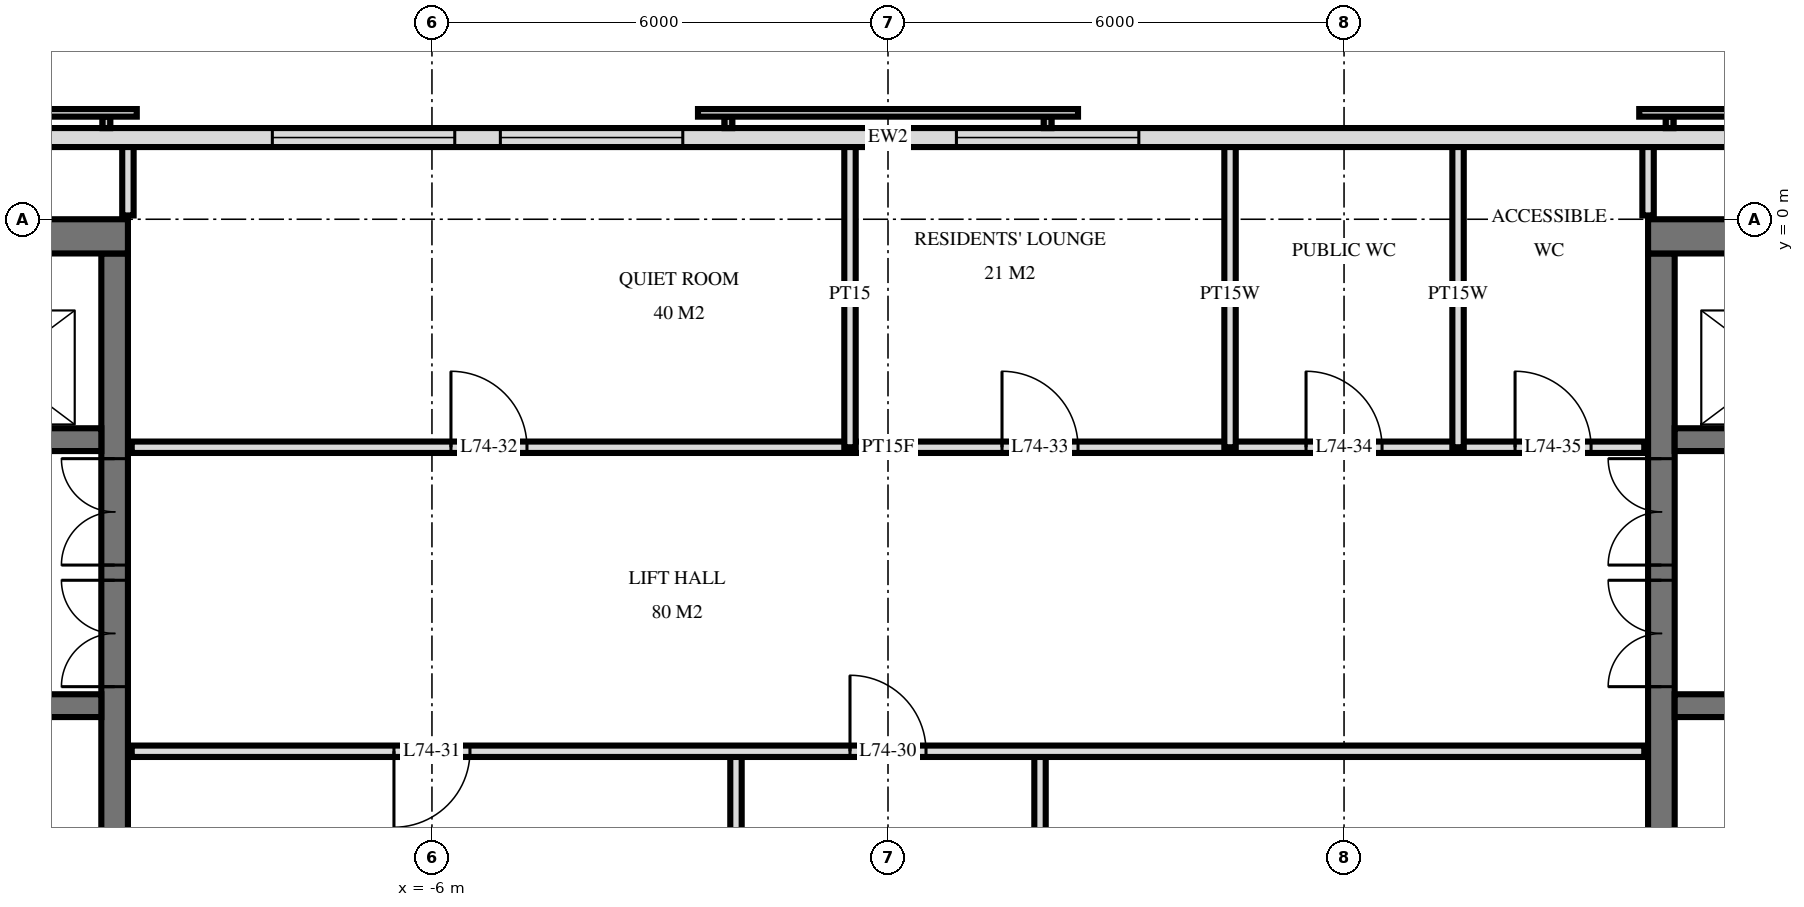
"""IFC4 building model, lengths in metres.
Left out: names, types, materials, properties, quantities, classifications, styles, units other than length and angle.
Written with IfcOpenShell. Run it as: python <this file> out.ifc"""

import sys

from ifc_helpers import new_model, si_unit, direction, frame, frame_2d, origin, place, context, subcontext, project, spatial, rectangle, extrude, element, fill, save


model = new_model("IFC4")
c1 = context("Model", 3, precision=1e-05, world=origin(), true_north=direction((0.0, 1.0)))
c2 = subcontext(c1, "Body", "Model", "MODEL_VIEW")
j1 = project(units=[si_unit("LENGTHUNIT", "METRE"), si_unit("PLANEANGLEUNIT", "RADIAN")], contexts=[c1])
p1 = place(None, origin())
s1 = spatial("IfcSite", under=j1, at=p1, CompositionType="ELEMENT")
p2 = place(p1, origin())
s2 = spatial("IfcBuilding", under=s1, at=p2, CompositionType="ELEMENT")
p3 = place(p2, frame((0.0, 0.0, 280.6)))
s3 = spatial("IfcBuildingStorey", under=s2, at=p3, CompositionType="ELEMENT", Elevation=280.6)
p4 = place(p3, frame((-19.5, -0.225, 0.0), z_axis=(0.0, 0.0, 1.0), x_axis=(1.0, 0.0, 0.0)))
e1 = element("IfcWall", 1, at=p4, inside=s3, PredefinedType="SHEAR", context=c2, shape_type="SweptSolid", body=[
    extrude(rectangle(XDim=9.5, YDim=0.45, at=frame_2d((4.75, 0.0))), origin(), (0.0, 0.0, 1.0), 3.5),
])
p5 = place(p3, frame((-10.175, -14.55, 0.0), z_axis=(0.0, 0.0, 1.0), x_axis=(0.0, 1.0, 0.0)))
e2 = element("IfcWall", 2, at=p5, inside=s3, PredefinedType="SHEAR", context=c2, shape_type="SweptSolid", body=[
    extrude(rectangle(XDim=14.1, YDim=0.35, at=frame_2d((7.05, 0.0))), origin(), (0.0, 0.0, 1.0), 3.5),
])
p6 = place(p5, frame((8.4, 0.0, 0.0)))
e3 = element("IfcOpeningElement", 3, at=p6, cuts=e2, PredefinedType="OPENING", context=c2, shape_type="SweptSolid", body=[
    extrude(rectangle(XDim=1.4, YDim=2.4, at=frame_2d((0.7, 1.2))), frame((0.0, 0.185, 0.0), z_axis=(0.0, -1.0, 0.0), x_axis=(1.0, 0.0, 0.0)), (0.0, 0.0, 1.0), 0.37),
])
p7 = place(p5, frame((10.0, 0.0, 0.0)))
e4 = element("IfcOpeningElement", 4, at=p7, cuts=e2, PredefinedType="OPENING", context=c2, shape_type="SweptSolid", body=[
    extrude(rectangle(XDim=1.4, YDim=2.4, at=frame_2d((0.7, 1.2))), frame((0.0, 0.185, 0.0), z_axis=(0.0, -1.0, 0.0), x_axis=(1.0, 0.0, 0.0)), (0.0, 0.0, 1.0), 0.37),
])
p8 = place(p5, frame((4.0, 0.0, 0.0)))
e5 = element("IfcOpeningElement", 5, at=p8, cuts=e2, PredefinedType="OPENING", context=c2, shape_type="SweptSolid", body=[
    extrude(rectangle(XDim=1.2, YDim=2.1, at=frame_2d((0.6, 1.05))), frame((0.0, 0.185, 0.0), z_axis=(0.0, -1.0, 0.0), x_axis=(1.0, 0.0, 0.0)), (0.0, 0.0, 1.0), 0.37),
])
p9 = place(p3, frame((-19.05, -2.9, 0.0), z_axis=(0.0, 0.0, 1.0), x_axis=(1.0, 0.0, 0.0)))
e6 = element("IfcWall", 6, at=p9, inside=s3, PredefinedType="SHEAR", context=c2, shape_type="SweptSolid", body=[
    extrude(rectangle(XDim=8.7, YDim=0.3, at=frame_2d((4.35, 0.0))), origin(), (0.0, 0.0, 1.0), 3.5),
])
p10 = place(p9, frame((6.8, 0.0, 0.0)))
e7 = element("IfcOpeningElement", 7, at=p10, cuts=e6, PredefinedType="OPENING", context=c2, shape_type="SweptSolid", body=[
    extrude(rectangle(XDim=1.1, YDim=2.1, at=frame_2d((0.55, 1.05))), frame((0.0, 0.16, 0.0), z_axis=(0.0, -1.0, 0.0), x_axis=(1.0, 0.0, 0.0)), (0.0, 0.0, 1.0), 0.32),
])
p11 = place(p9, frame((3.8, 0.0, 0.0)))
e8 = element("IfcOpeningElement", 8, at=p11, cuts=e6, PredefinedType="OPENING", context=c2, shape_type="SweptSolid", body=[
    extrude(rectangle(XDim=1.1, YDim=2.1, at=frame_2d((0.55, 1.05))), frame((0.0, 0.16, 0.0), z_axis=(0.0, -1.0, 0.0), x_axis=(1.0, 0.0, 0.0)), (0.0, 0.0, 1.0), 0.32),
])
p12 = place(p9, frame((0.9, 0.0, 0.0)))
e9 = element("IfcOpeningElement", 9, at=p12, cuts=e6, PredefinedType="OPENING", context=c2, shape_type="SweptSolid", body=[
    extrude(rectangle(XDim=0.9, YDim=2.1, at=frame_2d((0.45, 1.05))), frame((0.0, 0.16, 0.0), z_axis=(0.0, -1.0, 0.0), x_axis=(1.0, 0.0, 0.0)), (0.0, 0.0, 1.0), 0.32),
])
p13 = place(p3, frame((-19.05, -6.4, 0.0), z_axis=(0.0, 0.0, 1.0), x_axis=(1.0, 0.0, 0.0)))
e10 = element("IfcWall", 10, at=p13, inside=s3, PredefinedType="SHEAR", context=c2, shape_type="SweptSolid", body=[
    extrude(rectangle(XDim=8.7, YDim=0.3, at=frame_2d((4.35, 0.0))), origin(), (0.0, 0.0, 1.0), 3.5),
])
p14 = place(p13, frame((0.8, 0.0, 0.0)))
e11 = element("IfcOpeningElement", 11, at=p14, cuts=e10, PredefinedType="OPENING", context=c2, shape_type="SweptSolid", body=[
    extrude(rectangle(XDim=1.1, YDim=2.1, at=frame_2d((0.55, 1.05))), frame((0.0, 0.16, 0.0), z_axis=(0.0, -1.0, 0.0), x_axis=(1.0, 0.0, 0.0)), (0.0, 0.0, 1.0), 0.32),
])
p15 = place(p3, frame((10.0, -0.225, 0.0), z_axis=(0.0, 0.0, 1.0), x_axis=(1.0, 0.0, 0.0)))
e12 = element("IfcWall", 12, at=p15, inside=s3, PredefinedType="SHEAR", context=c2, shape_type="SweptSolid", body=[
    extrude(rectangle(XDim=9.5, YDim=0.45, at=frame_2d((4.75, 0.0))), origin(), (0.0, 0.0, 1.0), 3.5),
])
p16 = place(p3, frame((10.175, -14.55, 0.0), z_axis=(0.0, 0.0, 1.0), x_axis=(0.0, 1.0, 0.0)))
e13 = element("IfcWall", 13, at=p16, inside=s3, PredefinedType="SHEAR", context=c2, shape_type="SweptSolid", body=[
    extrude(rectangle(XDim=14.1, YDim=0.35, at=frame_2d((7.05, 0.0))), origin(), (0.0, 0.0, 1.0), 3.5),
])
p17 = place(p16, frame((8.4, 0.0, 0.0)))
e14 = element("IfcOpeningElement", 14, at=p17, cuts=e13, PredefinedType="OPENING", context=c2, shape_type="SweptSolid", body=[
    extrude(rectangle(XDim=1.4, YDim=2.4, at=frame_2d((0.7, 1.2))), frame((0.0, 0.185, 0.0), z_axis=(0.0, -1.0, 0.0), x_axis=(1.0, 0.0, 0.0)), (0.0, 0.0, 1.0), 0.37),
])
p18 = place(p16, frame((10.0, 0.0, 0.0)))
e15 = element("IfcOpeningElement", 15, at=p18, cuts=e13, PredefinedType="OPENING", context=c2, shape_type="SweptSolid", body=[
    extrude(rectangle(XDim=1.4, YDim=2.4, at=frame_2d((0.7, 1.2))), frame((0.0, 0.185, 0.0), z_axis=(0.0, -1.0, 0.0), x_axis=(1.0, 0.0, 0.0)), (0.0, 0.0, 1.0), 0.37),
])
p19 = place(p16, frame((4.0, 0.0, 0.0)))
e16 = element("IfcOpeningElement", 16, at=p19, cuts=e13, PredefinedType="OPENING", context=c2, shape_type="SweptSolid", body=[
    extrude(rectangle(XDim=1.2, YDim=2.1, at=frame_2d((0.6, 1.05))), frame((0.0, 0.185, 0.0), z_axis=(0.0, -1.0, 0.0), x_axis=(1.0, 0.0, 0.0)), (0.0, 0.0, 1.0), 0.37),
])
p20 = place(p3, frame((10.35, -2.9, 0.0), z_axis=(0.0, 0.0, 1.0), x_axis=(1.0, 0.0, 0.0)))
e17 = element("IfcWall", 17, at=p20, inside=s3, PredefinedType="SHEAR", context=c2, shape_type="SweptSolid", body=[
    extrude(rectangle(XDim=8.7, YDim=0.3, at=frame_2d((4.35, 0.0))), origin(), (0.0, 0.0, 1.0), 3.5),
])
p21 = place(p20, frame((0.8, 0.0, 0.0)))
e18 = element("IfcOpeningElement", 18, at=p21, cuts=e17, PredefinedType="OPENING", context=c2, shape_type="SweptSolid", body=[
    extrude(rectangle(XDim=1.1, YDim=2.1, at=frame_2d((0.55, 1.05))), frame((0.0, 0.16, 0.0), z_axis=(0.0, -1.0, 0.0), x_axis=(1.0, 0.0, 0.0)), (0.0, 0.0, 1.0), 0.32),
])
p22 = place(p20, frame((3.8, 0.0, 0.0)))
e19 = element("IfcOpeningElement", 19, at=p22, cuts=e17, PredefinedType="OPENING", context=c2, shape_type="SweptSolid", body=[
    extrude(rectangle(XDim=1.1, YDim=2.1, at=frame_2d((0.55, 1.05))), frame((0.0, 0.16, 0.0), z_axis=(0.0, -1.0, 0.0), x_axis=(1.0, 0.0, 0.0)), (0.0, 0.0, 1.0), 0.32),
])
p23 = place(p20, frame((6.9, 0.0, 0.0)))
e20 = element("IfcOpeningElement", 20, at=p23, cuts=e17, PredefinedType="OPENING", context=c2, shape_type="SweptSolid", body=[
    extrude(rectangle(XDim=0.9, YDim=2.1, at=frame_2d((0.45, 1.05))), frame((0.0, 0.16, 0.0), z_axis=(0.0, -1.0, 0.0), x_axis=(1.0, 0.0, 0.0)), (0.0, 0.0, 1.0), 0.32),
])
p24 = place(p3, frame((10.35, -6.4, 0.0), z_axis=(0.0, 0.0, 1.0), x_axis=(1.0, 0.0, 0.0)))
e21 = element("IfcWall", 21, at=p24, inside=s3, PredefinedType="SHEAR", context=c2, shape_type="SweptSolid", body=[
    extrude(rectangle(XDim=8.7, YDim=0.3, at=frame_2d((4.35, 0.0))), origin(), (0.0, 0.0, 1.0), 3.5),
])
p25 = place(p24, frame((6.8, 0.0, 0.0)))
e22 = element("IfcOpeningElement", 22, at=p25, cuts=e21, PredefinedType="OPENING", context=c2, shape_type="SweptSolid", body=[
    extrude(rectangle(XDim=1.1, YDim=2.1, at=frame_2d((0.55, 1.05))), frame((0.0, 0.16, 0.0), z_axis=(0.0, -1.0, 0.0), x_axis=(1.0, 0.0, 0.0)), (0.0, 0.0, 1.0), 0.32),
])
p26 = place(p3, frame((18.575, 1.075, 0.0), z_axis=(0.0, 0.0, 1.0), x_axis=(-1.0, 0.0, 0.0)))
e23 = element("IfcWall", 23, at=p26, inside=s3, PredefinedType="SOLIDWALL", context=c2, shape_type="SweptSolid", body=[
    extrude(rectangle(XDim=37.151, YDim=0.25, at=frame_2d((18.575, 0.0))), origin(), (0.0, 0.0, 1.0), 3.22),
])
p27 = place(p26, frame((15.275, 0.0, 0.9)))
e24 = element("IfcOpeningElement", 24, at=p27, cuts=e23, PredefinedType="OPENING", context=c2, shape_type="SweptSolid", body=[
    extrude(rectangle(XDim=2.4, YDim=1.5, at=frame_2d((1.2, 0.75))), frame((0.0, 0.135, 0.0), z_axis=(0.0, -1.0, 0.0), x_axis=(1.0, 0.0, 0.0)), (0.0, 0.0, 1.0), 0.27),
])
p28 = place(p26, frame((21.275, 0.0, 0.9)))
e25 = element("IfcOpeningElement", 25, at=p28, cuts=e23, PredefinedType="OPENING", context=c2, shape_type="SweptSolid", body=[
    extrude(rectangle(XDim=2.4, YDim=1.5, at=frame_2d((1.2, 0.75))), frame((0.0, 0.135, 0.0), z_axis=(0.0, -1.0, 0.0), x_axis=(1.0, 0.0, 0.0)), (0.0, 0.0, 1.0), 0.27),
])
p29 = place(p26, frame((24.275, 0.0, 0.9)))
e26 = element("IfcOpeningElement", 26, at=p29, cuts=e23, PredefinedType="OPENING", context=c2, shape_type="SweptSolid", body=[
    extrude(rectangle(XDim=2.4, YDim=1.5, at=frame_2d((1.2, 0.75))), frame((0.0, 0.135, 0.0), z_axis=(0.0, -1.0, 0.0), x_axis=(1.0, 0.0, 0.0)), (0.0, 0.0, 1.0), 0.27),
])
p30 = place(p3, frame((10.0, 0.05, 0.0), z_axis=(0.0, 0.0, 1.0), x_axis=(0.0, 1.0, 0.0)))
e27 = element("IfcWall", 27, at=p30, inside=s3, PredefinedType="PLUMBINGWALL", context=c2, shape_type="SweptSolid", body=[
    extrude(rectangle(XDim=0.97, YDim=0.15, at=frame_2d((0.485, 0.0))), origin(), (0.0, 0.0, 1.0), 3.22),
])
for number, where, z_axis, x_axis in (
    (28, (7.5, -3.0, 0.0), (0.0, 0.0, 1.0), (0.0, 1.0, 0.0)),
    (29, (4.5, -3.0, 0.0), (0.0, 0.0, 1.0), (0.0, 1.0, 0.0)),
):
    element("IfcWall", number, at=place(p3, frame(where, z_axis=z_axis, x_axis=x_axis)), inside=s3, PredefinedType="PLUMBINGWALL", context=c2, shape_type="SweptSolid", body=[
        extrude(rectangle(XDim=4.02, YDim=0.15, at=frame_2d((2.01, 0.0))), origin(), (0.0, 0.0, 1.0), 3.22),
    ])
p31 = place(p3, frame((2.0, -11.0, 0.0), z_axis=(0.0, 0.0, 1.0), x_axis=(0.0, 1.0, 0.0)))
e30 = element("IfcWall", 30, at=p31, inside=s3, PredefinedType="PARTITIONING", context=c2, shape_type="SweptSolid", body=[
    extrude(rectangle(XDim=4.0, YDim=0.15, at=frame_2d((2.0, 0.0))), origin(), (0.0, 0.0, 1.0), 3.22),
])
p32 = place(p3, frame((-0.5, -3.0, 0.0), z_axis=(0.0, 0.0, 1.0), x_axis=(0.0, 1.0, 0.0)))
e31 = element("IfcWall", 31, at=p32, inside=s3, PredefinedType="PARTITIONING", context=c2, shape_type="SweptSolid", body=[
    extrude(rectangle(XDim=4.02, YDim=0.15, at=frame_2d((2.01, 0.0))), origin(), (0.0, 0.0, 1.0), 3.22),
])
p33 = place(p3, frame((-2.0, -11.0, 0.0), z_axis=(0.0, 0.0, 1.0), x_axis=(0.0, 1.0, 0.0)))
e32 = element("IfcWall", 32, at=p33, inside=s3, PredefinedType="PARTITIONING", context=c2, shape_type="SweptSolid", body=[
    extrude(rectangle(XDim=4.0, YDim=0.15, at=frame_2d((2.0, 0.0))), origin(), (0.0, 0.0, 1.0), 3.22),
])
p34 = place(p3, frame((-10.0, 0.05, 0.0), z_axis=(0.0, 0.0, 1.0), x_axis=(0.0, 1.0, 0.0)))
e33 = element("IfcWall", 33, at=p34, inside=s3, PredefinedType="PARTITIONING", context=c2, shape_type="SweptSolid", body=[
    extrude(rectangle(XDim=0.97, YDim=0.15, at=frame_2d((0.485, 0.0))), origin(), (0.0, 0.0, 1.0), 3.22),
])
p35 = place(p3, frame((-9.95, -7.0, 0.0), z_axis=(0.0, 0.0, 1.0), x_axis=(1.0, 0.0, 0.0)))
e34 = element("IfcWall", 34, at=p35, inside=s3, PredefinedType="PARTITIONING", context=c2, shape_type="SweptSolid", body=[
    extrude(rectangle(XDim=19.9, YDim=0.15, at=frame_2d((9.95, 0.0))), origin(), (0.0, 0.0, 1.0), 3.22),
])
p36 = place(p35, frame((9.45, 0.0, 0.0)))
e35 = element("IfcOpeningElement", 35, at=p36, cuts=e34, PredefinedType="OPENING", context=c2, shape_type="SweptSolid", body=[
    extrude(rectangle(XDim=1.0, YDim=2.1, at=frame_2d((0.5, 1.05))), frame((0.0, 0.085, 0.0), z_axis=(0.0, -1.0, 0.0), x_axis=(1.0, 0.0, 0.0)), (0.0, 0.0, 1.0), 0.17),
])
p37 = place(p35, frame((3.45, 0.0, 0.0)))
e36 = element("IfcOpeningElement", 36, at=p37, cuts=e34, PredefinedType="OPENING", context=c2, shape_type="SweptSolid", body=[
    extrude(rectangle(XDim=1.0, YDim=2.1, at=frame_2d((0.5, 1.05))), frame((0.0, 0.085, 0.0), z_axis=(0.0, -1.0, 0.0), x_axis=(1.0, 0.0, 0.0)), (0.0, 0.0, 1.0), 0.17),
])
p38 = place(p3, frame((-9.95, -3.0, 0.0), z_axis=(0.0, 0.0, 1.0), x_axis=(1.0, 0.0, 0.0)))
e37 = element("IfcWall", 37, at=p38, inside=s3, PredefinedType="PARTITIONING", context=c2, shape_type="SweptSolid", body=[
    extrude(rectangle(XDim=19.9, YDim=0.15, at=frame_2d((9.95, 0.0))), origin(), (0.0, 0.0, 1.0), 3.22),
])
p39 = place(p38, frame((4.2, 0.0, 0.0)))
e38 = element("IfcOpeningElement", 38, at=p39, cuts=e37, PredefinedType="OPENING", context=c2, shape_type="SweptSolid", body=[
    extrude(rectangle(XDim=1.0, YDim=2.1, at=frame_2d((0.5, 1.05))), frame((0.0, 0.085, 0.0), z_axis=(0.0, -1.0, 0.0), x_axis=(1.0, 0.0, 0.0)), (0.0, 0.0, 1.0), 0.17),
])
p40 = place(p38, frame((11.45, 0.0, 0.0)))
e39 = element("IfcOpeningElement", 39, at=p40, cuts=e37, PredefinedType="OPENING", context=c2, shape_type="SweptSolid", body=[
    extrude(rectangle(XDim=1.0, YDim=2.1, at=frame_2d((0.5, 1.05))), frame((0.0, 0.085, 0.0), z_axis=(0.0, -1.0, 0.0), x_axis=(1.0, 0.0, 0.0)), (0.0, 0.0, 1.0), 0.17),
])
p41 = place(p38, frame((15.45, 0.0, 0.0)))
e40 = element("IfcOpeningElement", 40, at=p41, cuts=e37, PredefinedType="OPENING", context=c2, shape_type="SweptSolid", body=[
    extrude(rectangle(XDim=1.0, YDim=2.1, at=frame_2d((0.5, 1.05))), frame((0.0, 0.085, 0.0), z_axis=(0.0, -1.0, 0.0), x_axis=(1.0, 0.0, 0.0)), (0.0, 0.0, 1.0), 0.17),
])
p42 = place(p38, frame((18.2, 0.0, 0.0)))
e41 = element("IfcOpeningElement", 41, at=p42, cuts=e37, PredefinedType="OPENING", context=c2, shape_type="SweptSolid", body=[
    extrude(rectangle(XDim=1.0, YDim=2.1, at=frame_2d((0.5, 1.05))), frame((0.0, 0.085, 0.0), z_axis=(0.0, -1.0, 0.0), x_axis=(1.0, 0.0, 0.0)), (0.0, 0.0, 1.0), 0.17),
])
p43 = place(p27, origin())
e42 = element("IfcWindow", 42, at=p43, inside=s3, PartitioningType="SINGLE_PANEL", PredefinedType="WINDOW", context=c2, shape_type="SweptSolid", body=[
    extrude(rectangle(XDim=2.4, YDim=1.5, at=frame_2d((1.2, 0.75))), frame((0.0, 0.03, 0.0), z_axis=(0.0, -1.0, 0.0), x_axis=(1.0, 0.0, 0.0)), (0.0, 0.0, 1.0), 0.06),
])
fill(e24, e42)
p44 = place(p28, origin())
e43 = element("IfcWindow", 43, at=p44, inside=s3, PartitioningType="SINGLE_PANEL", PredefinedType="WINDOW", context=c2, shape_type="SweptSolid", body=[
    extrude(rectangle(XDim=2.4, YDim=1.5, at=frame_2d((1.2, 0.75))), frame((0.0, 0.03, 0.0), z_axis=(0.0, -1.0, 0.0), x_axis=(1.0, 0.0, 0.0)), (0.0, 0.0, 1.0), 0.06),
])
fill(e25, e43)
p45 = place(p29, origin())
e44 = element("IfcWindow", 44, at=p45, inside=s3, PartitioningType="SINGLE_PANEL", PredefinedType="WINDOW", context=c2, shape_type="SweptSolid", body=[
    extrude(rectangle(XDim=2.4, YDim=1.5, at=frame_2d((1.2, 0.75))), frame((0.0, 0.03, 0.0), z_axis=(0.0, -1.0, 0.0), x_axis=(1.0, 0.0, 0.0)), (0.0, 0.0, 1.0), 0.06),
])
fill(e26, e44)
p46 = place(p6, origin())
e45 = element("IfcDoor", 45, at=p46, inside=s3, OperationType="DOUBLE_DOOR_SINGLE_SWING", PredefinedType="DOOR", context=c2, shape_type="SweptSolid", body=[
    extrude(rectangle(XDim=1.4, YDim=2.4, at=frame_2d((0.7, 1.2))), frame((0.0, 0.025, 0.0), z_axis=(0.0, -1.0, 0.0), x_axis=(1.0, 0.0, 0.0)), (0.0, 0.0, 1.0), 0.05),
])
fill(e3, e45)
p47 = place(p7, origin())
e46 = element("IfcDoor", 46, at=p47, inside=s3, OperationType="DOUBLE_DOOR_SINGLE_SWING", PredefinedType="DOOR", context=c2, shape_type="SweptSolid", body=[
    extrude(rectangle(XDim=1.4, YDim=2.4, at=frame_2d((0.7, 1.2))), frame((0.0, 0.025, 0.0), z_axis=(0.0, -1.0, 0.0), x_axis=(1.0, 0.0, 0.0)), (0.0, 0.0, 1.0), 0.05),
])
fill(e4, e46)
p48 = place(p17, origin())
e47 = element("IfcDoor", 47, at=p48, inside=s3, OperationType="DOUBLE_DOOR_SINGLE_SWING", PredefinedType="DOOR", context=c2, shape_type="SweptSolid", body=[
    extrude(rectangle(XDim=1.4, YDim=2.4, at=frame_2d((0.7, 1.2))), frame((0.0, 0.025, 0.0), z_axis=(0.0, -1.0, 0.0), x_axis=(1.0, 0.0, 0.0)), (0.0, 0.0, 1.0), 0.05),
])
fill(e14, e47)
p49 = place(p18, origin())
e48 = element("IfcDoor", 48, at=p49, inside=s3, OperationType="DOUBLE_DOOR_SINGLE_SWING", PredefinedType="DOOR", context=c2, shape_type="SweptSolid", body=[
    extrude(rectangle(XDim=1.4, YDim=2.4, at=frame_2d((0.7, 1.2))), frame((0.0, 0.025, 0.0), z_axis=(0.0, -1.0, 0.0), x_axis=(1.0, 0.0, 0.0)), (0.0, 0.0, 1.0), 0.05),
])
fill(e15, e48)
p50 = place(p36, origin())
e49 = element("IfcDoor", 49, at=p50, inside=s3, OperationType="SINGLE_SWING_RIGHT", PredefinedType="DOOR", context=c2, shape_type="SweptSolid", body=[
    extrude(rectangle(XDim=1.0, YDim=2.1, at=frame_2d((0.5, 1.05))), frame((0.0, 0.025, 0.0), z_axis=(0.0, -1.0, 0.0), x_axis=(1.0, 0.0, 0.0)), (0.0, 0.0, 1.0), 0.05),
])
fill(e35, e49)
p51 = place(p37, frame((0.5, 0.0, 0.0), z_axis=(0.0, 0.0, 1.0), x_axis=(-1.0, 0.0, 0.0)))
e50 = element("IfcDoor", 50, at=p51, inside=s3, OperationType="SINGLE_SWING_LEFT", PredefinedType="DOOR", context=c2, shape_type="SweptSolid", body=[
    extrude(rectangle(XDim=1.0, YDim=2.1, at=frame_2d((0.0, 1.05))), frame((0.0, -0.025, 0.0), z_axis=(0.0, 1.0, 0.0), x_axis=(-1.0, 0.0, 0.0)), (0.0, 0.0, 1.0), 0.05),
])
fill(e36, e50)
p52 = place(p39, origin())
e51 = element("IfcDoor", 51, at=p52, inside=s3, OperationType="SINGLE_SWING_RIGHT", PredefinedType="DOOR", context=c2, shape_type="SweptSolid", body=[
    extrude(rectangle(XDim=1.0, YDim=2.1, at=frame_2d((0.5, 1.05))), frame((0.0, 0.025, 0.0), z_axis=(0.0, -1.0, 0.0), x_axis=(1.0, 0.0, 0.0)), (0.0, 0.0, 1.0), 0.05),
])
fill(e38, e51)
p53 = place(p40, origin())
e52 = element("IfcDoor", 52, at=p53, inside=s3, OperationType="SINGLE_SWING_RIGHT", PredefinedType="DOOR", context=c2, shape_type="SweptSolid", body=[
    extrude(rectangle(XDim=1.0, YDim=2.1, at=frame_2d((0.5, 1.05))), frame((0.0, 0.025, 0.0), z_axis=(0.0, -1.0, 0.0), x_axis=(1.0, 0.0, 0.0)), (0.0, 0.0, 1.0), 0.05),
])
fill(e39, e52)
p54 = place(p41, origin())
e53 = element("IfcDoor", 53, at=p54, inside=s3, OperationType="SINGLE_SWING_RIGHT", PredefinedType="DOOR", context=c2, shape_type="SweptSolid", body=[
    extrude(rectangle(XDim=1.0, YDim=2.1, at=frame_2d((0.5, 1.05))), frame((0.0, 0.025, 0.0), z_axis=(0.0, -1.0, 0.0), x_axis=(1.0, 0.0, 0.0)), (0.0, 0.0, 1.0), 0.05),
])
fill(e40, e53)
p55 = place(p42, origin())
e54 = element("IfcDoor", 54, at=p55, inside=s3, OperationType="SINGLE_SWING_RIGHT", PredefinedType="DOOR", context=c2, shape_type="SweptSolid", body=[
    extrude(rectangle(XDim=1.0, YDim=2.1, at=frame_2d((0.5, 1.05))), frame((0.0, 0.025, 0.0), z_axis=(0.0, -1.0, 0.0), x_axis=(1.0, 0.0, 0.0)), (0.0, 0.0, 1.0), 0.05),
])
fill(e41, e54)
save(model, sys.argv[1])
